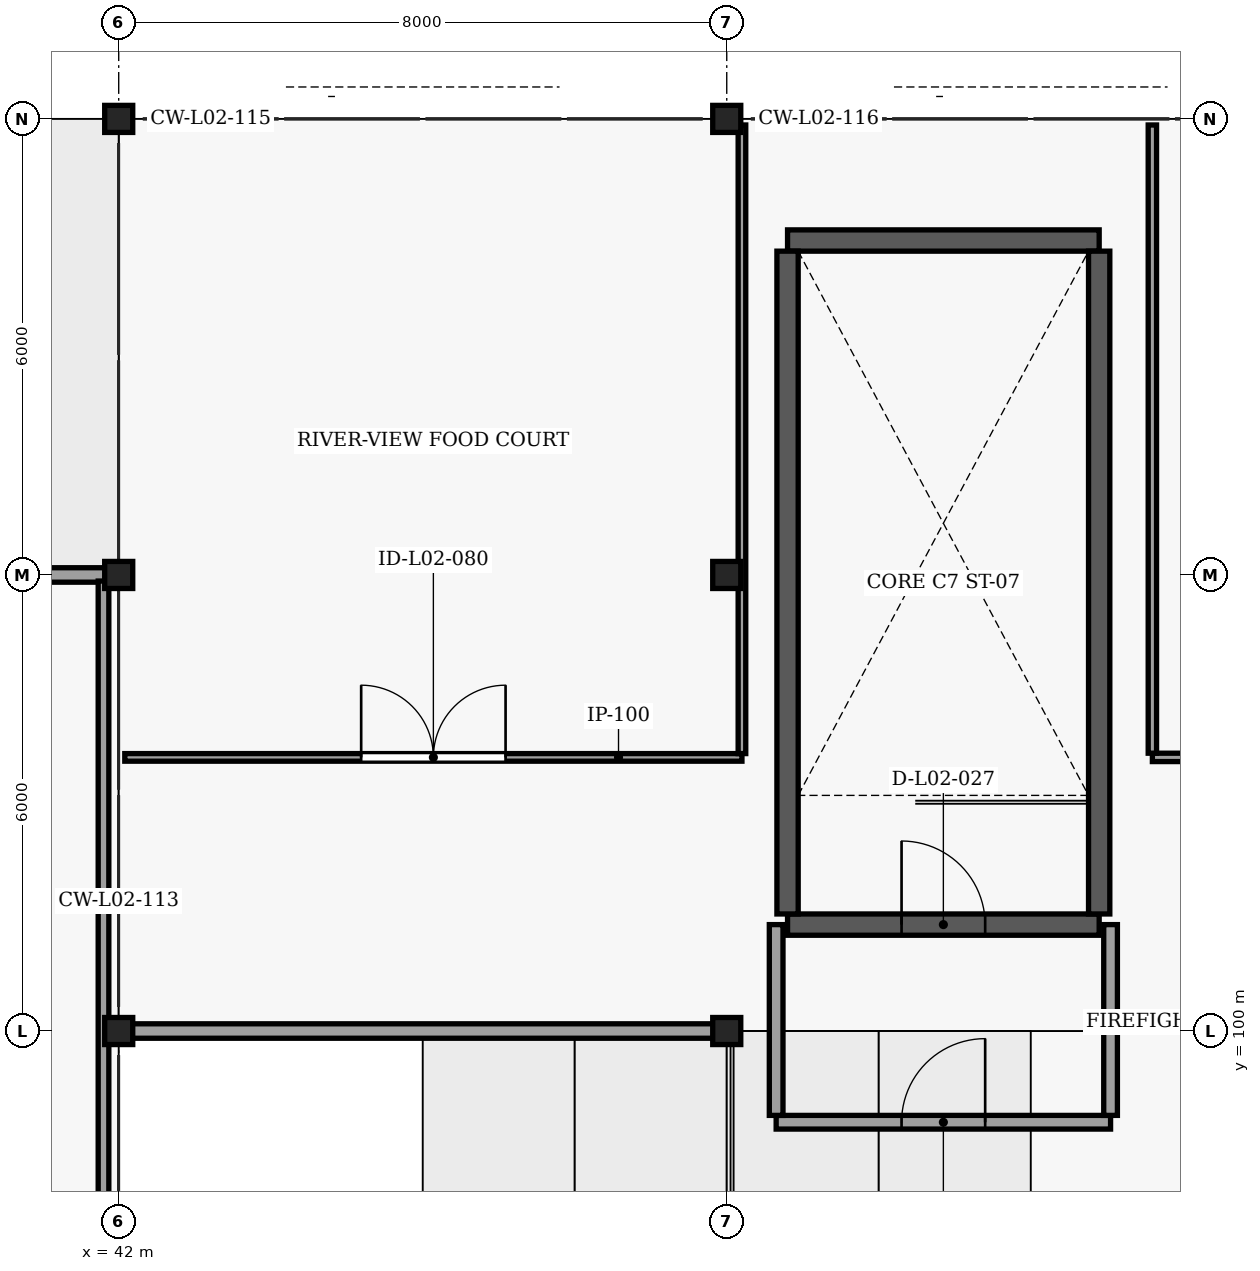
"""IFC4 building model, lengths in metres.
Left out: names, types, materials, properties, quantities, classifications, styles, units other than length and angle.
Written with IfcOpenShell. Run it as: python <this file> out.ifc"""

import sys

from ifc_helpers import new_model, si_unit, direction, frame, frame_2d, origin, origin_2d, place, context, subcontext, project, spatial, rectangle, i_section, extrude, element, fill, save


model = new_model("IFC4")
c1 = context("Model", 3, precision=1e-05, world=origin(), true_north=direction((0.0, 1.0)))
c2 = subcontext(c1, "Body", "Model", "MODEL_VIEW")
j1 = project(units=[si_unit("LENGTHUNIT", "METRE"), si_unit("PLANEANGLEUNIT", "RADIAN")], contexts=[c1])
p1 = place(None, origin())
s1 = spatial("IfcSite", under=j1, at=p1, CompositionType="ELEMENT")
p2 = place(p1, origin())
s2 = spatial("IfcBuilding", under=s1, at=p2, CompositionType="ELEMENT")
p3 = place(p2, frame((0.0, 0.0, 5.4)))
s3 = spatial("IfcBuildingStorey", under=s2, at=p3, CompositionType="ELEMENT", Elevation=5.4)
p4 = place(p3, frame((42.0, 100.0, 0.0), z_axis=(0.0, 0.0, 1.0), x_axis=(1.0, 0.0, 0.0)))
e1 = element("IfcColumn", 1, at=p4, inside=s3, PredefinedType="COLUMN", context=c2, shape_type="SweptSolid", body=[
    extrude(i_section(OverallWidth=0.369, OverallDepth=0.356, WebThickness=0.011, FlangeThickness=0.018, FilletRadius=0.015, at=origin_2d()), origin(), (0.0, 0.0, 1.0), 4.56),
])
p5 = place(p3, frame((50.0, 100.0, 0.0), z_axis=(0.0, 0.0, 1.0), x_axis=(1.0, 0.0, 0.0)))
e2 = element("IfcColumn", 2, at=p5, inside=s3, PredefinedType="COLUMN", context=c2, shape_type="SweptSolid", body=[
    extrude(i_section(OverallWidth=0.369, OverallDepth=0.356, WebThickness=0.011, FlangeThickness=0.018, FilletRadius=0.015, at=origin_2d()), origin(), (0.0, 0.0, 1.0), 4.45),
])
p6 = place(p3, frame((42.0, 106.0, 0.0), z_axis=(0.0, 0.0, 1.0), x_axis=(1.0, 0.0, 0.0)))
e3 = element("IfcColumn", 3, at=p6, inside=s3, PredefinedType="COLUMN", context=c2, shape_type="SweptSolid", body=[
    extrude(i_section(OverallWidth=0.369, OverallDepth=0.356, WebThickness=0.011, FlangeThickness=0.018, FilletRadius=0.015, at=origin_2d()), origin(), (0.0, 0.0, 1.0), 4.56),
])
for number, where, z_axis, x_axis in (
    (4, (50.0, 106.0, 0.0), (0.0, 0.0, 1.0), (1.0, 0.0, 0.0)),
    (5, (42.0, 112.0, 0.0), (0.0, 0.0, 1.0), (1.0, 0.0, 0.0)),
    (6, (50.0, 112.0, 0.0), (0.0, 0.0, 1.0), (1.0, 0.0, 0.0)),
):
    element("IfcColumn", number, at=place(p3, frame(where, z_axis=z_axis, x_axis=x_axis)), inside=s3, PredefinedType="COLUMN", context=c2, shape_type="SweptSolid", body=[
        extrude(i_section(OverallWidth=0.369, OverallDepth=0.356, WebThickness=0.011, FlangeThickness=0.018, FilletRadius=0.015, at=origin_2d()), origin(), (0.0, 0.0, 1.0), 4.45),
    ])
p7 = place(p3, frame((50.8, 101.4, 0.0), z_axis=(0.0, 0.0, 1.0), x_axis=(1.0, 0.0, 0.0)))
e7 = element("IfcWall", 7, at=p7, inside=s3, PredefinedType="SHEAR", context=c2, shape_type="SweptSolid", body=[
    extrude(rectangle(XDim=4.1, YDim=0.28, at=frame_2d((2.05, 0.0))), origin(), (0.0, 0.0, 1.0), 5.7),
])
p8 = place(p7, frame((1.5, 0.0, 0.0)))
e8 = element("IfcOpeningElement", 8, at=p8, cuts=e7, PredefinedType="OPENING", context=c2, shape_type="SweptSolid", body=[
    extrude(rectangle(XDim=1.1, YDim=2.2, at=frame_2d((0.55, 1.1))), frame((0.0, 0.15, 0.0), z_axis=(0.0, -1.0, 0.0), x_axis=(1.0, 0.0, 0.0)), (0.0, 0.0, 1.0), 0.3),
])
p9 = place(p3, frame((50.8, 110.4, 0.0), z_axis=(0.0, 0.0, 1.0), x_axis=(1.0, 0.0, 0.0)))
e9 = element("IfcWall", 9, at=p9, inside=s3, PredefinedType="SHEAR", context=c2, shape_type="SweptSolid", body=[
    extrude(rectangle(XDim=4.1, YDim=0.28, at=frame_2d((2.05, 0.0))), origin(), (0.0, 0.0, 1.0), 5.7),
])
for number, where, z_axis, x_axis in (
    (10, (50.8, 101.54, 0.0), (0.0, 0.0, 1.0), (0.0, 1.0, 0.0)),
    (11, (54.9, 101.54, 0.0), (0.0, 0.0, 1.0), (0.0, 1.0, 0.0)),
):
    element("IfcWall", number, at=place(p3, frame(where, z_axis=z_axis, x_axis=x_axis)), inside=s3, PredefinedType="SHEAR", context=c2, shape_type="SweptSolid", body=[
        extrude(rectangle(XDim=8.72, YDim=0.28, at=frame_2d((4.36, 0.0))), origin(), (0.0, 0.0, 1.0), 5.7),
    ])
p10 = place(p3, frame((42.169, 100.0, 0.0), z_axis=(0.0, 0.0, 1.0), x_axis=(1.0, 0.0, 0.0)))
e12 = element("IfcWall", 12, at=p10, inside=s3, PredefinedType="SOLIDWALL", context=c2, shape_type="SweptSolid", body=[
    extrude(rectangle(XDim=7.661, YDim=0.19, at=frame_2d((3.831, 0.0))), origin(), (0.0, 0.0, 1.0), 1.041),
])
p11 = place(p3, frame((32.169, 106.0, 0.0), z_axis=(0.0, 0.0, 1.0), x_axis=(1.0, 0.0, 0.0)))
e13 = element("IfcWall", 13, at=p11, inside=s3, PredefinedType="SOLIDWALL", context=c2, shape_type="SweptSolid", body=[
    extrude(rectangle(XDim=9.831, YDim=0.19, at=frame_2d((4.915, 0.0))), origin(), (0.0, 0.0, 1.0), 4.098),
])
p12 = place(p11, frame((1.21, 0.0, 0.95)))
e14 = element("IfcOpeningElement", 14, at=p12, cuts=e13, PredefinedType="OPENING", context=c2, shape_type="SweptSolid", body=[
    extrude(rectangle(XDim=2.4, YDim=1.6, at=frame_2d((1.2, 0.8))), frame((0.0, 0.105, 0.0), z_axis=(0.0, -1.0, 0.0), x_axis=(1.0, 0.0, 0.0)), (0.0, 0.0, 1.0), 0.21),
])
p13 = place(p11, frame((4.51, 0.0, 0.95)))
e15 = element("IfcOpeningElement", 15, at=p13, cuts=e13, PredefinedType="OPENING", context=c2, shape_type="SweptSolid", body=[
    extrude(rectangle(XDim=2.3, YDim=1.58, at=frame_2d((1.15, 0.79))), frame((0.0, 0.105, 0.0), z_axis=(0.0, -1.0, 0.0), x_axis=(1.0, 0.0, 0.0)), (0.0, 0.0, 1.0), 0.21),
])
p14 = place(p3, frame((50.65, 98.8, 0.0), z_axis=(0.0, 0.0, 1.0), x_axis=(1.0, 0.0, 0.0)))
e16 = element("IfcWall", 16, at=p14, inside=s3, PredefinedType="SOLIDWALL", context=c2, shape_type="SweptSolid", body=[
    extrude(rectangle(XDim=4.4, YDim=0.18, at=frame_2d((2.2, 0.0))), origin(), (0.0, 0.0, 1.0), 4.5),
])
p15 = place(p14, frame((1.65, 0.0, 0.0)))
e17 = element("IfcOpeningElement", 17, at=p15, cuts=e16, PredefinedType="OPENING", context=c2, shape_type="SweptSolid", body=[
    extrude(rectangle(XDim=1.1, YDim=2.2, at=frame_2d((0.55, 1.1))), frame((0.0, 0.1, 0.0), z_axis=(0.0, -1.0, 0.0), x_axis=(1.0, 0.0, 0.0)), (0.0, 0.0, 1.0), 0.2),
])
p16 = place(p3, frame((50.65, 98.89, 0.0), z_axis=(0.0, 0.0, 1.0), x_axis=(0.0, 1.0, 0.0)))
e18 = element("IfcWall", 18, at=p16, inside=s3, PredefinedType="SOLIDWALL", context=c2, shape_type="SweptSolid", body=[
    extrude(rectangle(XDim=2.51, YDim=0.18, at=frame_2d((1.255, 0.0))), origin(), (0.0, 0.0, 1.0), 2.506),
])
p17 = place(p3, frame((55.05, 98.89, 0.0), z_axis=(0.0, 0.0, 1.0), x_axis=(0.0, 1.0, 0.0)))
e19 = element("IfcWall", 19, at=p17, inside=s3, PredefinedType="SOLIDWALL", context=c2, shape_type="SweptSolid", body=[
    extrude(rectangle(XDim=2.51, YDim=0.18, at=frame_2d((1.255, 0.0))), origin(), (0.0, 0.0, 1.0), 3.99),
])
p18 = place(p3, frame((41.8, 95.87, 0.0), z_axis=(0.0, 0.0, 1.0), x_axis=(0.0, 1.0, 0.0)))
e20 = element("IfcWall", 20, at=p18, inside=s3, PredefinedType="PARTITIONING", context=c2, shape_type="SweptSolid", body=[
    extrude(rectangle(XDim=10.05, YDim=0.14, at=frame_2d((5.025, 0.0))), origin(), (0.0, 0.0, 1.0), 4.033),
])
p19 = place(p3, frame((42.08, 103.6, 0.0), z_axis=(0.0, 0.0, 1.0), x_axis=(1.0, 0.0, 0.0)))
e21 = element("IfcWall", 21, at=p19, inside=s3, PredefinedType="MOVABLE", context=c2, shape_type="SweptSolid", body=[
    extrude(rectangle(XDim=8.12, YDim=0.1, at=frame_2d((4.06, 0.0))), origin(), (0.0, 0.0, 1.0), 4.033),
])
p20 = place(p19, frame((3.11, 0.0, 0.0)))
e22 = element("IfcOpeningElement", 22, at=p20, cuts=e21, PredefinedType="OPENING", context=c2, shape_type="SweptSolid", body=[
    extrude(rectangle(XDim=1.9, YDim=2.35, at=frame_2d((0.95, 1.175))), frame((0.0, 0.06, 0.0), z_axis=(0.0, -1.0, 0.0), x_axis=(1.0, 0.0, 0.0)), (0.0, 0.0, 1.0), 0.12),
])
p21 = place(p3, frame((50.2, 103.65, 0.0), z_axis=(0.0, 0.0, 1.0), x_axis=(0.0, 1.0, 0.0)))
e23 = element("IfcWall", 23, at=p21, inside=s3, PredefinedType="MOVABLE", context=c2, shape_type="SweptSolid", body=[
    extrude(rectangle(XDim=8.27, YDim=0.1, at=frame_2d((4.135, 0.0))), origin(), (0.0, 0.0, 1.0), 3.99),
])
p22 = place(p3, frame((55.6, 103.6, 0.0), z_axis=(0.0, 0.0, 1.0), x_axis=(1.0, 0.0, 0.0)))
e24 = element("IfcWall", 24, at=p22, inside=s3, PredefinedType="MOVABLE", context=c2, shape_type="SweptSolid", body=[
    extrude(rectangle(XDim=10.0, YDim=0.11, at=frame_2d((5.0, 0.0))), origin(), (0.0, 0.0, 1.0), 4.033),
])
p23 = place(p22, frame((4.1, 0.0, 0.0)))
e25 = element("IfcOpeningElement", 25, at=p23, cuts=e24, PredefinedType="OPENING", context=c2, shape_type="SweptSolid", body=[
    extrude(rectangle(XDim=1.8, YDim=2.3, at=frame_2d((0.9, 1.15))), frame((0.0, 0.065, 0.0), z_axis=(0.0, -1.0, 0.0), x_axis=(1.0, 0.0, 0.0)), (0.0, 0.0, 1.0), 0.13),
])
p24 = place(p3, frame((55.6, 103.655, 0.0), z_axis=(0.0, 0.0, 1.0), x_axis=(0.0, 1.0, 0.0)))
e26 = element("IfcWall", 26, at=p24, inside=s3, PredefinedType="MOVABLE", context=c2, shape_type="SweptSolid", body=[
    extrude(rectangle(XDim=8.265, YDim=0.11, at=frame_2d((4.132, 0.0))), origin(), (0.0, 0.0, 1.0), 3.99),
])
p25 = place(p8, origin())
e27 = element("IfcDoor", 27, at=p25, inside=s3, OperationType="SINGLE_SWING_LEFT", PredefinedType="DOOR", context=c2, shape_type="SweptSolid", body=[
    extrude(rectangle(XDim=1.1, YDim=2.2, at=frame_2d((0.55, 1.1))), frame((0.0, 0.025, 0.0), z_axis=(0.0, -1.0, 0.0), x_axis=(1.0, 0.0, 0.0)), (0.0, 0.0, 1.0), 0.05),
])
fill(e8, e27)
p26 = place(p15, origin())
e28 = element("IfcDoor", 28, at=p26, inside=s3, OperationType="SINGLE_SWING_RIGHT", PredefinedType="DOOR", context=c2, shape_type="SweptSolid", body=[
    extrude(rectangle(XDim=1.1, YDim=2.2, at=frame_2d((0.55, 1.1))), frame((0.0, 0.025, 0.0), z_axis=(0.0, -1.0, 0.0), x_axis=(1.0, 0.0, 0.0)), (0.0, 0.0, 1.0), 0.05),
])
fill(e17, e28)
p27 = place(p20, origin())
e29 = element("IfcDoor", 29, at=p27, inside=s3, OperationType="DOUBLE_DOOR_SINGLE_SWING", PredefinedType="DOOR", context=c2, shape_type="SweptSolid", body=[
    extrude(rectangle(XDim=1.9, YDim=2.35, at=frame_2d((0.95, 1.175))), frame((0.0, 0.025, 0.0), z_axis=(0.0, -1.0, 0.0), x_axis=(1.0, 0.0, 0.0)), (0.0, 0.0, 1.0), 0.05),
])
fill(e22, e29)
save(model, sys.argv[1])
